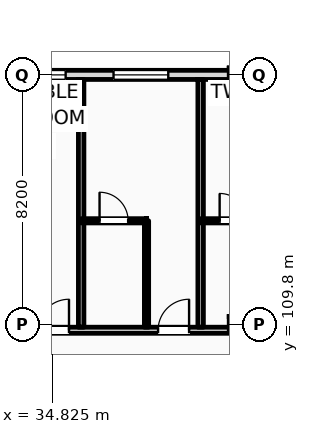
"""IFC4 building model, lengths in metres.
Left out: names, types, materials, properties, quantities, classifications, styles, units other than length and angle.
Written with IfcOpenShell. Run it as: python <this file> out.ifc"""

import sys

from ifc_helpers import new_model, si_unit, direction, frame, frame_2d, origin, place, context, subcontext, project, spatial, rectangle, extrude, element, fill, save


model = new_model("IFC4")
c1 = context("Model", 3, precision=1e-05, world=origin(), true_north=direction((0.0, 1.0)))
c2 = subcontext(c1, "Body", "Model", "MODEL_VIEW")
j1 = project(units=[si_unit("LENGTHUNIT", "METRE"), si_unit("PLANEANGLEUNIT", "RADIAN")], contexts=[c1])
p1 = place(None, origin())
s1 = spatial("IfcSite", under=j1, at=p1, CompositionType="ELEMENT")
p2 = place(p1, origin())
s2 = spatial("IfcBuilding", under=s1, at=p2, CompositionType="ELEMENT")
p3 = place(p2, frame((0.0, 0.0, 24.6)))
s3 = spatial("IfcBuildingStorey", under=s2, at=p3, CompositionType="ELEMENT", Elevation=24.6)
p4 = place(p3, frame((22.5, 118.0, 0.0), z_axis=(0.0, 0.0, 1.0), x_axis=(1.0, 0.0, 0.0)))
e1 = element("IfcWall", 1, at=p4, inside=s3, PredefinedType="STANDARD", context=c2, shape_type="SweptSolid", body=[
    extrude(rectangle(XDim=97.5, YDim=0.3, at=frame_2d((48.75, 0.0))), origin(), (0.0, 0.0, 1.0), 2.78),
])
p5 = place(p4, frame((0.91, 0.0, 0.9)))
e2 = element("IfcOpeningElement", 2, at=p5, cuts=e1, PredefinedType="OPENING", context=c2, shape_type="SweptSolid", body=[
    extrude(rectangle(XDim=0.9, YDim=1.7, at=frame_2d((0.45, 0.85))), frame((0.0, 0.16, 0.0), z_axis=(0.0, -1.0, 0.0), x_axis=(1.0, 0.0, 0.0)), (0.0, 0.0, 1.0), 0.32),
])
p6 = place(p4, frame((6.275, 0.0, 0.0)))
e3 = element("IfcOpeningElement", 3, at=p6, cuts=e1, PredefinedType="OPENING", context=c2, shape_type="SweptSolid", body=[
    extrude(rectangle(XDim=1.2, YDim=2.25, at=frame_2d((0.6, 1.125))), frame((0.0, 0.16, 0.0), z_axis=(0.0, -1.0, 0.0), x_axis=(1.0, 0.0, 0.0)), (0.0, 0.0, 1.0), 0.32),
])
p7 = place(p4, frame((11.42, 0.0, 0.9)))
e4 = element("IfcOpeningElement", 4, at=p7, cuts=e1, PredefinedType="OPENING", context=c2, shape_type="SweptSolid", body=[
    extrude(rectangle(XDim=1.35, YDim=1.7, at=frame_2d((0.675, 0.85))), frame((0.0, 0.16, 0.0), z_axis=(0.0, -1.0, 0.0), x_axis=(1.0, 0.0, 0.0)), (0.0, 0.0, 1.0), 0.32),
])
p8 = place(p4, frame((14.345, 0.0, 0.9)))
e5 = element("IfcOpeningElement", 5, at=p8, cuts=e1, PredefinedType="OPENING", context=c2, shape_type="SweptSolid", body=[
    extrude(rectangle(XDim=1.8, YDim=1.7, at=frame_2d((0.9, 0.85))), frame((0.0, 0.16, 0.0), z_axis=(0.0, -1.0, 0.0), x_axis=(1.0, 0.0, 0.0)), (0.0, 0.0, 1.0), 0.32),
])
p9 = place(p4, frame((19.27, 0.0, 0.9)))
e6 = element("IfcOpeningElement", 6, at=p9, cuts=e1, PredefinedType="OPENING", context=c2, shape_type="SweptSolid", body=[
    extrude(rectangle(XDim=1.95, YDim=1.7, at=frame_2d((0.975, 0.85))), frame((0.0, 0.16, 0.0), z_axis=(0.0, -1.0, 0.0), x_axis=(1.0, 0.0, 0.0)), (0.0, 0.0, 1.0), 0.32),
])
p10 = place(p4, frame((22.97, 0.0, 0.0)))
e7 = element("IfcOpeningElement", 7, at=p10, cuts=e1, PredefinedType="OPENING", context=c2, shape_type="SweptSolid", body=[
    extrude(rectangle(XDim=1.2, YDim=2.25, at=frame_2d((0.6, 1.125))), frame((0.0, 0.16, 0.0), z_axis=(0.0, -1.0, 0.0), x_axis=(1.0, 0.0, 0.0)), (0.0, 0.0, 1.0), 0.32),
])
p11 = place(p4, frame((26.92, 0.0, 0.9)))
e8 = element("IfcOpeningElement", 8, at=p11, cuts=e1, PredefinedType="OPENING", context=c2, shape_type="SweptSolid", body=[
    extrude(rectangle(XDim=2.25, YDim=1.7, at=frame_2d((1.125, 0.85))), frame((0.0, 0.16, 0.0), z_axis=(0.0, -1.0, 0.0), x_axis=(1.0, 0.0, 0.0)), (0.0, 0.0, 1.0), 0.32),
])
p12 = place(p4, frame((30.645, 0.0, 0.9)))
e9 = element("IfcOpeningElement", 9, at=p12, cuts=e1, PredefinedType="OPENING", context=c2, shape_type="SweptSolid", body=[
    extrude(rectangle(XDim=2.4, YDim=1.7, at=frame_2d((1.2, 0.85))), frame((0.0, 0.16, 0.0), z_axis=(0.0, -1.0, 0.0), x_axis=(1.0, 0.0, 0.0)), (0.0, 0.0, 1.0), 0.32),
])
p13 = place(p4, frame((36.71, 0.0, 0.0)))
e10 = element("IfcOpeningElement", 10, at=p13, cuts=e1, PredefinedType="OPENING", context=c2, shape_type="SweptSolid", body=[
    extrude(rectangle(XDim=1.2, YDim=2.25, at=frame_2d((0.6, 1.125))), frame((0.0, 0.16, 0.0), z_axis=(0.0, -1.0, 0.0), x_axis=(1.0, 0.0, 0.0)), (0.0, 0.0, 1.0), 0.32),
])
p14 = place(p4, frame((39.17, 0.0, 0.0)))
e11 = element("IfcOpeningElement", 11, at=p14, cuts=e1, PredefinedType="OPENING", context=c2, shape_type="SweptSolid", body=[
    extrude(rectangle(XDim=1.2, YDim=2.25, at=frame_2d((0.6, 1.125))), frame((0.0, 0.16, 0.0), z_axis=(0.0, -1.0, 0.0), x_axis=(1.0, 0.0, 0.0)), (0.0, 0.0, 1.0), 0.32),
])
p15 = place(p4, frame((43.22, 0.0, 0.9)))
e12 = element("IfcOpeningElement", 12, at=p15, cuts=e1, PredefinedType="OPENING", context=c2, shape_type="SweptSolid", body=[
    extrude(rectangle(XDim=2.85, YDim=1.7, at=frame_2d((1.425, 0.85))), frame((0.0, 0.16, 0.0), z_axis=(0.0, -1.0, 0.0), x_axis=(1.0, 0.0, 0.0)), (0.0, 0.0, 1.0), 0.32),
])
p16 = place(p4, frame((47.29, 0.0, 0.9)))
e13 = element("IfcOpeningElement", 13, at=p16, cuts=e1, PredefinedType="OPENING", context=c2, shape_type="SweptSolid", body=[
    extrude(rectangle(XDim=1.35, YDim=1.7, at=frame_2d((0.675, 0.85))), frame((0.0, 0.16, 0.0), z_axis=(0.0, -1.0, 0.0), x_axis=(1.0, 0.0, 0.0)), (0.0, 0.0, 1.0), 0.32),
])
p17 = place(p4, frame((52.91, 0.0, 0.0)))
e14 = element("IfcOpeningElement", 14, at=p17, cuts=e1, PredefinedType="OPENING", context=c2, shape_type="SweptSolid", body=[
    extrude(rectangle(XDim=1.2, YDim=2.25, at=frame_2d((0.6, 1.125))), frame((0.0, 0.16, 0.0), z_axis=(0.0, -1.0, 0.0), x_axis=(1.0, 0.0, 0.0)), (0.0, 0.0, 1.0), 0.32),
])
p18 = place(p4, frame((55.69, 0.0, 0.9)))
e15 = element("IfcOpeningElement", 15, at=p18, cuts=e1, PredefinedType="OPENING", context=c2, shape_type="SweptSolid", body=[
    extrude(rectangle(XDim=0.9, YDim=1.7, at=frame_2d((0.45, 0.85))), frame((0.0, 0.16, 0.0), z_axis=(0.0, -1.0, 0.0), x_axis=(1.0, 0.0, 0.0)), (0.0, 0.0, 1.0), 0.32),
])
p19 = place(p4, frame((59.82, 0.0, 0.9)))
e16 = element("IfcOpeningElement", 16, at=p19, cuts=e1, PredefinedType="OPENING", context=c2, shape_type="SweptSolid", body=[
    extrude(rectangle(XDim=3.25, YDim=1.7, at=frame_2d((1.625, 0.85))), frame((0.0, 0.16, 0.0), z_axis=(0.0, -1.0, 0.0), x_axis=(1.0, 0.0, 0.0)), (0.0, 0.0, 1.0), 0.32),
])
p20 = place(p4, frame((65.89, 0.0, 0.9)))
e17 = element("IfcOpeningElement", 17, at=p20, cuts=e1, PredefinedType="OPENING", context=c2, shape_type="SweptSolid", body=[
    extrude(rectangle(XDim=1.1, YDim=1.7, at=frame_2d((0.55, 0.85))), frame((0.0, 0.16, 0.0), z_axis=(0.0, -1.0, 0.0), x_axis=(1.0, 0.0, 0.0)), (0.0, 0.0, 1.0), 0.32),
])
p21 = place(p4, frame((69.245, 0.0, 0.0)))
e18 = element("IfcOpeningElement", 18, at=p21, cuts=e1, PredefinedType="OPENING", context=c2, shape_type="SweptSolid", body=[
    extrude(rectangle(XDim=1.2, YDim=2.25, at=frame_2d((0.6, 1.125))), frame((0.0, 0.16, 0.0), z_axis=(0.0, -1.0, 0.0), x_axis=(1.0, 0.0, 0.0)), (0.0, 0.0, 1.0), 0.32),
])
p22 = place(p4, frame((73.69, 0.0, 0.9)))
e19 = element("IfcOpeningElement", 19, at=p22, cuts=e1, PredefinedType="OPENING", context=c2, shape_type="SweptSolid", body=[
    extrude(rectangle(XDim=1.8, YDim=1.7, at=frame_2d((0.9, 0.85))), frame((0.0, 0.16, 0.0), z_axis=(0.0, -1.0, 0.0), x_axis=(1.0, 0.0, 0.0)), (0.0, 0.0, 1.0), 0.32),
])
p23 = place(p4, frame((76.62, 0.0, 0.9)))
e20 = element("IfcOpeningElement", 20, at=p23, cuts=e1, PredefinedType="OPENING", context=c2, shape_type="SweptSolid", body=[
    extrude(rectangle(XDim=3.25, YDim=1.7, at=frame_2d((1.625, 0.85))), frame((0.0, 0.16, 0.0), z_axis=(0.0, -1.0, 0.0), x_axis=(1.0, 0.0, 0.0)), (0.0, 0.0, 1.0), 0.32),
])
p24 = place(p4, frame((81.895, 0.0, 0.9)))
e21 = element("IfcOpeningElement", 21, at=p24, cuts=e1, PredefinedType="OPENING", context=c2, shape_type="SweptSolid", body=[
    extrude(rectangle(XDim=1.1, YDim=1.5, at=frame_2d((0.55, 0.75))), frame((0.0, 0.16, 0.0), z_axis=(0.0, -1.0, 0.0), x_axis=(1.0, 0.0, 0.0)), (0.0, 0.0, 1.0), 0.32),
])
p25 = place(p4, frame((86.02, 0.0, 0.9)))
e22 = element("IfcOpeningElement", 22, at=p25, cuts=e1, PredefinedType="OPENING", context=c2, shape_type="SweptSolid", body=[
    extrude(rectangle(XDim=1.25, YDim=1.6, at=frame_2d((0.625, 0.8))), frame((0.0, 0.16, 0.0), z_axis=(0.0, -1.0, 0.0), x_axis=(1.0, 0.0, 0.0)), (0.0, 0.0, 1.0), 0.32),
])
p26 = place(p4, frame((90.145, 0.0, 0.9)))
e23 = element("IfcOpeningElement", 23, at=p26, cuts=e1, PredefinedType="OPENING", context=c2, shape_type="SweptSolid", body=[
    extrude(rectangle(XDim=1.4, YDim=1.7, at=frame_2d((0.7, 0.85))), frame((0.0, 0.16, 0.0), z_axis=(0.0, -1.0, 0.0), x_axis=(1.0, 0.0, 0.0)), (0.0, 0.0, 1.0), 0.32),
])
p27 = place(p4, frame((94.155, 0.0, 0.9)))
e24 = element("IfcOpeningElement", 24, at=p27, cuts=e1, PredefinedType="OPENING", context=c2, shape_type="SweptSolid", body=[
    extrude(rectangle(XDim=1.6, YDim=1.7, at=frame_2d((0.8, 0.85))), frame((0.0, 0.16, 0.0), z_axis=(0.0, -1.0, 0.0), x_axis=(1.0, 0.0, 0.0)), (0.0, 0.0, 1.0), 0.32),
])
p28 = place(p3, frame((10.65, 109.6, 0.0), z_axis=(0.0, 0.0, 1.0), x_axis=(1.0, 0.0, 0.0)))
e25 = element("IfcWall", 25, at=p28, inside=s3, PredefinedType="PARTITIONING", context=c2, shape_type="SweptSolid", body=[
    extrude(rectangle(XDim=109.21, YDim=0.2, at=frame_2d((54.605, 0.0))), origin(), (0.0, 0.0, 1.0), 2.78),
])
p29 = place(p28, frame((12.705, 0.0, 0.0)))
e26 = element("IfcOpeningElement", 26, at=p29, cuts=e25, PredefinedType="OPENING", context=c2, shape_type="SweptSolid", body=[
    extrude(rectangle(XDim=1.02, YDim=2.2, at=frame_2d((0.51, 1.1))), frame((0.0, 0.11, 0.0), z_axis=(0.0, -1.0, 0.0), x_axis=(1.0, 0.0, 0.0)), (0.0, 0.0, 1.0), 0.22),
])
p30 = place(p28, frame((19.26, 0.0, 0.0)))
e27 = element("IfcOpeningElement", 27, at=p30, cuts=e25, PredefinedType="OPENING", context=c2, shape_type="SweptSolid", body=[
    extrude(rectangle(XDim=1.02, YDim=2.2, at=frame_2d((0.51, 1.1))), frame((0.0, 0.11, 0.0), z_axis=(0.0, -1.0, 0.0), x_axis=(1.0, 0.0, 0.0)), (0.0, 0.0, 1.0), 0.22),
])
p31 = place(p28, frame((23.71, 0.0, 0.0)))
e28 = element("IfcOpeningElement", 28, at=p31, cuts=e25, PredefinedType="OPENING", context=c2, shape_type="SweptSolid", body=[
    extrude(rectangle(XDim=1.02, YDim=2.2, at=frame_2d((0.51, 1.1))), frame((0.0, 0.11, 0.0), z_axis=(0.0, -1.0, 0.0), x_axis=(1.0, 0.0, 0.0)), (0.0, 0.0, 1.0), 0.22),
])
p32 = place(p28, frame((27.66, 0.0, 0.0)))
e29 = element("IfcOpeningElement", 29, at=p32, cuts=e25, PredefinedType="OPENING", context=c2, shape_type="SweptSolid", body=[
    extrude(rectangle(XDim=1.02, YDim=2.2, at=frame_2d((0.51, 1.1))), frame((0.0, 0.11, 0.0), z_axis=(0.0, -1.0, 0.0), x_axis=(1.0, 0.0, 0.0)), (0.0, 0.0, 1.0), 0.22),
])
p33 = place(p28, frame((31.89, 0.0, 0.0)))
e30 = element("IfcOpeningElement", 30, at=p33, cuts=e25, PredefinedType="OPENING", context=c2, shape_type="SweptSolid", body=[
    extrude(rectangle(XDim=0.96, YDim=2.2, at=frame_2d((0.48, 1.1))), frame((0.0, 0.11, 0.0), z_axis=(0.0, -1.0, 0.0), x_axis=(1.0, 0.0, 0.0)), (0.0, 0.0, 1.0), 0.22),
])
p34 = place(p28, frame((33.94, 0.0, 0.0)))
e31 = element("IfcOpeningElement", 31, at=p34, cuts=e25, PredefinedType="OPENING", context=c2, shape_type="SweptSolid", body=[
    extrude(rectangle(XDim=0.96, YDim=2.2, at=frame_2d((0.48, 1.1))), frame((0.0, 0.11, 0.0), z_axis=(0.0, -1.0, 0.0), x_axis=(1.0, 0.0, 0.0)), (0.0, 0.0, 1.0), 0.22),
])
p35 = place(p28, frame((40.29, 0.0, 0.0)))
e32 = element("IfcOpeningElement", 32, at=p35, cuts=e25, PredefinedType="OPENING", context=c2, shape_type="SweptSolid", body=[
    extrude(rectangle(XDim=0.96, YDim=2.2, at=frame_2d((0.48, 1.1))), frame((0.0, 0.11, 0.0), z_axis=(0.0, -1.0, 0.0), x_axis=(1.0, 0.0, 0.0)), (0.0, 0.0, 1.0), 0.22),
])
p36 = place(p28, frame((42.34, 0.0, 0.0)))
e33 = element("IfcOpeningElement", 33, at=p36, cuts=e25, PredefinedType="OPENING", context=c2, shape_type="SweptSolid", body=[
    extrude(rectangle(XDim=0.96, YDim=2.2, at=frame_2d((0.48, 1.1))), frame((0.0, 0.11, 0.0), z_axis=(0.0, -1.0, 0.0), x_axis=(1.0, 0.0, 0.0)), (0.0, 0.0, 1.0), 0.22),
])
p37 = place(p28, frame((48.69, 0.0, 0.0)))
e34 = element("IfcOpeningElement", 34, at=p37, cuts=e25, PredefinedType="OPENING", context=c2, shape_type="SweptSolid", body=[
    extrude(rectangle(XDim=0.96, YDim=2.2, at=frame_2d((0.48, 1.1))), frame((0.0, 0.11, 0.0), z_axis=(0.0, -1.0, 0.0), x_axis=(1.0, 0.0, 0.0)), (0.0, 0.0, 1.0), 0.22),
])
p38 = place(p28, frame((50.74, 0.0, 0.0)))
e35 = element("IfcOpeningElement", 35, at=p38, cuts=e25, PredefinedType="OPENING", context=c2, shape_type="SweptSolid", body=[
    extrude(rectangle(XDim=0.96, YDim=2.2, at=frame_2d((0.48, 1.1))), frame((0.0, 0.11, 0.0), z_axis=(0.0, -1.0, 0.0), x_axis=(1.0, 0.0, 0.0)), (0.0, 0.0, 1.0), 0.22),
])
p39 = place(p28, frame((57.09, 0.0, 0.0)))
e36 = element("IfcOpeningElement", 36, at=p39, cuts=e25, PredefinedType="OPENING", context=c2, shape_type="SweptSolid", body=[
    extrude(rectangle(XDim=0.96, YDim=2.2, at=frame_2d((0.48, 1.1))), frame((0.0, 0.11, 0.0), z_axis=(0.0, -1.0, 0.0), x_axis=(1.0, 0.0, 0.0)), (0.0, 0.0, 1.0), 0.22),
])
p40 = place(p28, frame((59.14, 0.0, 0.0)))
e37 = element("IfcOpeningElement", 37, at=p40, cuts=e25, PredefinedType="OPENING", context=c2, shape_type="SweptSolid", body=[
    extrude(rectangle(XDim=0.96, YDim=2.2, at=frame_2d((0.48, 1.1))), frame((0.0, 0.11, 0.0), z_axis=(0.0, -1.0, 0.0), x_axis=(1.0, 0.0, 0.0)), (0.0, 0.0, 1.0), 0.22),
])
p41 = place(p28, frame((65.49, 0.0, 0.0)))
e38 = element("IfcOpeningElement", 38, at=p41, cuts=e25, PredefinedType="OPENING", context=c2, shape_type="SweptSolid", body=[
    extrude(rectangle(XDim=0.96, YDim=2.2, at=frame_2d((0.48, 1.1))), frame((0.0, 0.11, 0.0), z_axis=(0.0, -1.0, 0.0), x_axis=(1.0, 0.0, 0.0)), (0.0, 0.0, 1.0), 0.22),
])
p42 = place(p28, frame((67.54, 0.0, 0.0)))
e39 = element("IfcOpeningElement", 39, at=p42, cuts=e25, PredefinedType="OPENING", context=c2, shape_type="SweptSolid", body=[
    extrude(rectangle(XDim=0.96, YDim=2.2, at=frame_2d((0.48, 1.1))), frame((0.0, 0.11, 0.0), z_axis=(0.0, -1.0, 0.0), x_axis=(1.0, 0.0, 0.0)), (0.0, 0.0, 1.0), 0.22),
])
p43 = place(p28, frame((73.89, 0.0, 0.0)))
e40 = element("IfcOpeningElement", 40, at=p43, cuts=e25, PredefinedType="OPENING", context=c2, shape_type="SweptSolid", body=[
    extrude(rectangle(XDim=0.96, YDim=2.2, at=frame_2d((0.48, 1.1))), frame((0.0, 0.11, 0.0), z_axis=(0.0, -1.0, 0.0), x_axis=(1.0, 0.0, 0.0)), (0.0, 0.0, 1.0), 0.22),
])
p44 = place(p28, frame((78.09, 0.0, 0.0)))
e41 = element("IfcOpeningElement", 41, at=p44, cuts=e25, PredefinedType="OPENING", context=c2, shape_type="SweptSolid", body=[
    extrude(rectangle(XDim=0.96, YDim=2.2, at=frame_2d((0.48, 1.1))), frame((0.0, 0.11, 0.0), z_axis=(0.0, -1.0, 0.0), x_axis=(1.0, 0.0, 0.0)), (0.0, 0.0, 1.0), 0.22),
])
p45 = place(p28, frame((82.29, 0.0, 0.0)))
e42 = element("IfcOpeningElement", 42, at=p45, cuts=e25, PredefinedType="OPENING", context=c2, shape_type="SweptSolid", body=[
    extrude(rectangle(XDim=0.96, YDim=2.2, at=frame_2d((0.48, 1.1))), frame((0.0, 0.11, 0.0), z_axis=(0.0, -1.0, 0.0), x_axis=(1.0, 0.0, 0.0)), (0.0, 0.0, 1.0), 0.22),
])
p46 = place(p28, frame((86.49, 0.0, 0.0)))
e43 = element("IfcOpeningElement", 43, at=p46, cuts=e25, PredefinedType="OPENING", context=c2, shape_type="SweptSolid", body=[
    extrude(rectangle(XDim=0.96, YDim=2.2, at=frame_2d((0.48, 1.1))), frame((0.0, 0.11, 0.0), z_axis=(0.0, -1.0, 0.0), x_axis=(1.0, 0.0, 0.0)), (0.0, 0.0, 1.0), 0.22),
])
p47 = place(p28, frame((88.54, 0.0, 0.0)))
e44 = element("IfcOpeningElement", 44, at=p47, cuts=e25, PredefinedType="OPENING", context=c2, shape_type="SweptSolid", body=[
    extrude(rectangle(XDim=0.96, YDim=2.2, at=frame_2d((0.48, 1.1))), frame((0.0, 0.11, 0.0), z_axis=(0.0, -1.0, 0.0), x_axis=(1.0, 0.0, 0.0)), (0.0, 0.0, 1.0), 0.22),
])
p48 = place(p28, frame((94.89, 0.0, 0.0)))
e45 = element("IfcOpeningElement", 45, at=p48, cuts=e25, PredefinedType="OPENING", context=c2, shape_type="SweptSolid", body=[
    extrude(rectangle(XDim=0.96, YDim=2.2, at=frame_2d((0.48, 1.1))), frame((0.0, 0.11, 0.0), z_axis=(0.0, -1.0, 0.0), x_axis=(1.0, 0.0, 0.0)), (0.0, 0.0, 1.0), 0.22),
])
p49 = place(p28, frame((96.94, 0.0, 0.0)))
e46 = element("IfcOpeningElement", 46, at=p49, cuts=e25, PredefinedType="OPENING", context=c2, shape_type="SweptSolid", body=[
    extrude(rectangle(XDim=0.96, YDim=2.2, at=frame_2d((0.48, 1.1))), frame((0.0, 0.11, 0.0), z_axis=(0.0, -1.0, 0.0), x_axis=(1.0, 0.0, 0.0)), (0.0, 0.0, 1.0), 0.22),
])
p50 = place(p28, frame((103.29, 0.0, 0.0)))
e47 = element("IfcOpeningElement", 47, at=p50, cuts=e25, PredefinedType="OPENING", context=c2, shape_type="SweptSolid", body=[
    extrude(rectangle(XDim=0.96, YDim=2.2, at=frame_2d((0.48, 1.1))), frame((0.0, 0.11, 0.0), z_axis=(0.0, -1.0, 0.0), x_axis=(1.0, 0.0, 0.0)), (0.0, 0.0, 1.0), 0.22),
])
p51 = place(p28, frame((105.25, 0.0, 0.0)))
e48 = element("IfcOpeningElement", 48, at=p51, cuts=e25, PredefinedType="OPENING", context=c2, shape_type="SweptSolid", body=[
    extrude(rectangle(XDim=0.96, YDim=2.2, at=frame_2d((0.48, 1.1))), frame((0.0, 0.11, 0.0), z_axis=(0.0, -1.0, 0.0), x_axis=(1.0, 0.0, 0.0)), (0.0, 0.0, 1.0), 0.22),
])
p52 = place(p28, frame((2.716, 0.0, 0.0)))
e49 = element("IfcOpeningElement", 49, at=p52, cuts=e25, PredefinedType="OPENING", context=c2, shape_type="SweptSolid", body=[
    extrude(rectangle(XDim=1.35, YDim=2.25, at=frame_2d((0.675, 1.125))), frame((0.0, 0.11, 0.0), z_axis=(0.0, -1.0, 0.0), x_axis=(1.0, 0.0, 0.0)), (0.0, 0.0, 1.0), 0.22),
])
p53 = place(p28, frame((6.65, 0.0, 0.0)))
e50 = element("IfcOpeningElement", 50, at=p53, cuts=e25, PredefinedType="OPENING", context=c2, shape_type="SweptSolid", body=[
    extrude(rectangle(XDim=1.35, YDim=2.25, at=frame_2d((0.675, 1.125))), frame((0.0, 0.11, 0.0), z_axis=(0.0, -1.0, 0.0), x_axis=(1.0, 0.0, 0.0)), (0.0, 0.0, 1.0), 0.22),
])
p54 = place(p28, frame((10.583, 0.0, 0.0)))
e51 = element("IfcOpeningElement", 51, at=p54, cuts=e25, PredefinedType="OPENING", context=c2, shape_type="SweptSolid", body=[
    extrude(rectangle(XDim=1.35, YDim=2.25, at=frame_2d((0.675, 1.125))), frame((0.0, 0.11, 0.0), z_axis=(0.0, -1.0, 0.0), x_axis=(1.0, 0.0, 0.0)), (0.0, 0.0, 1.0), 0.22),
])
p55 = place(p3, frame((35.78, 109.7, 0.0), z_axis=(0.0, 0.0, 1.0), x_axis=(0.0, 1.0, 0.0)))
e52 = element("IfcWall", 52, at=p55, inside=s3, PredefinedType="PARTITIONING", context=c2, shape_type="SweptSolid", body=[
    extrude(rectangle(XDim=8.15, YDim=0.18, at=frame_2d((4.075, 0.0))), origin(), (0.0, 0.0, 1.0), 3.03),
])
p56 = place(p3, frame((39.71, 109.7, 0.0), z_axis=(0.0, 0.0, 1.0), x_axis=(0.0, 1.0, 0.0)))
e53 = element("IfcWall", 53, at=p56, inside=s3, PredefinedType="PARTITIONING", context=c2, shape_type="SweptSolid", body=[
    extrude(rectangle(XDim=8.15, YDim=0.18, at=frame_2d((4.075, 0.0))), origin(), (0.0, 0.0, 1.0), 3.34),
])
p57 = place(p3, frame((37.93, 109.7, 0.0), z_axis=(0.0, 0.0, 1.0), x_axis=(0.0, 1.0, 0.0)))
e54 = element("IfcWall", 54, at=p57, inside=s3, PredefinedType="PARTITIONING", context=c2, shape_type="SweptSolid", body=[
    extrude(rectangle(XDim=3.5, YDim=0.14, at=frame_2d((1.75, 0.0))), origin(), (0.0, 0.0, 1.0), 3.34),
])
p58 = place(p3, frame((35.78, 113.2, 0.0), z_axis=(0.0, 0.0, 1.0), x_axis=(1.0, 0.0, 0.0)))
e55 = element("IfcWall", 55, at=p58, inside=s3, PredefinedType="PARTITIONING", context=c2, shape_type="SweptSolid", body=[
    extrude(rectangle(XDim=2.15, YDim=0.14, at=frame_2d((1.075, 0.0))), origin(), (0.0, 0.0, 1.0), 3.34),
])
p59 = place(p58, frame((0.605, 0.0, 0.0)))
e56 = element("IfcOpeningElement", 56, at=p59, cuts=e55, PredefinedType="OPENING", context=c2, shape_type="SweptSolid", body=[
    extrude(rectangle(XDim=0.94, YDim=2.15, at=frame_2d((0.47, 1.075))), frame((0.0, 0.08, 0.0), z_axis=(0.0, -1.0, 0.0), x_axis=(1.0, 0.0, 0.0)), (0.0, 0.0, 1.0), 0.16),
])
p60 = place(p3, frame((39.71, 113.2, 0.0), z_axis=(0.0, 0.0, 1.0), x_axis=(1.0, 0.0, 0.0)))
e57 = element("IfcWall", 57, at=p60, inside=s3, PredefinedType="PARTITIONING", context=c2, shape_type="SweptSolid", body=[
    extrude(rectangle(XDim=2.15, YDim=0.14, at=frame_2d((1.075, 0.0))), origin(), (0.0, 0.0, 1.0), 3.34),
])
p61 = place(p60, frame((0.625, 0.0, 0.0)))
e58 = element("IfcOpeningElement", 58, at=p61, cuts=e57, PredefinedType="OPENING", context=c2, shape_type="SweptSolid", body=[
    extrude(rectangle(XDim=0.9, YDim=2.1, at=frame_2d((0.45, 1.05))), frame((0.0, 0.08, 0.0), z_axis=(0.0, -1.0, 0.0), x_axis=(1.0, 0.0, 0.0)), (0.0, 0.0, 1.0), 0.16),
])
p62 = place(p7, origin())
e59 = element("IfcWindow", 59, at=p62, inside=s3, PartitioningType="DOUBLE_PANEL_VERTICAL", PredefinedType="WINDOW", context=c2, shape_type="SweptSolid", body=[
    extrude(rectangle(XDim=1.35, YDim=1.7, at=frame_2d((0.675, 0.85))), frame((0.0, 0.03, 0.0), z_axis=(0.0, -1.0, 0.0), x_axis=(1.0, 0.0, 0.0)), (0.0, 0.0, 1.0), 0.06),
])
fill(e4, e59)
p63 = place(p8, origin())
e60 = element("IfcWindow", 60, at=p63, inside=s3, PartitioningType="DOUBLE_PANEL_VERTICAL", PredefinedType="WINDOW", context=c2, shape_type="SweptSolid", body=[
    extrude(rectangle(XDim=1.8, YDim=1.7, at=frame_2d((0.9, 0.85))), frame((0.0, 0.03, 0.0), z_axis=(0.0, -1.0, 0.0), x_axis=(1.0, 0.0, 0.0)), (0.0, 0.0, 1.0), 0.06),
])
fill(e5, e60)
p64 = place(p31, origin())
e61 = element("IfcDoor", 61, at=p64, inside=s3, OperationType="SINGLE_SWING_RIGHT", PredefinedType="DOOR", context=c2, shape_type="SweptSolid", body=[
    extrude(rectangle(XDim=1.02, YDim=2.2, at=frame_2d((0.51, 1.1))), frame((0.0, 0.025, 0.0), z_axis=(0.0, -1.0, 0.0), x_axis=(1.0, 0.0, 0.0)), (0.0, 0.0, 1.0), 0.05),
])
fill(e28, e61)
p65 = place(p32, origin())
e62 = element("IfcDoor", 62, at=p65, inside=s3, OperationType="SINGLE_SWING_RIGHT", PredefinedType="DOOR", context=c2, shape_type="SweptSolid", body=[
    extrude(rectangle(XDim=1.02, YDim=2.2, at=frame_2d((0.51, 1.1))), frame((0.0, 0.025, 0.0), z_axis=(0.0, -1.0, 0.0), x_axis=(1.0, 0.0, 0.0)), (0.0, 0.0, 1.0), 0.05),
])
fill(e29, e62)
p66 = place(p59, origin())
e63 = element("IfcDoor", 63, at=p66, inside=s3, OperationType="SINGLE_SWING_LEFT", PredefinedType="DOOR", context=c2, shape_type="SweptSolid", body=[
    extrude(rectangle(XDim=0.94, YDim=2.15, at=frame_2d((0.47, 1.075))), frame((0.0, 0.025, 0.0), z_axis=(0.0, -1.0, 0.0), x_axis=(1.0, 0.0, 0.0)), (0.0, 0.0, 1.0), 0.05),
])
fill(e56, e63)
p67 = place(p61, origin())
e64 = element("IfcDoor", 64, at=p67, inside=s3, OperationType="SINGLE_SWING_LEFT", PredefinedType="DOOR", context=c2, shape_type="SweptSolid", body=[
    extrude(rectangle(XDim=0.9, YDim=2.1, at=frame_2d((0.45, 1.05))), frame((0.0, 0.025, 0.0), z_axis=(0.0, -1.0, 0.0), x_axis=(1.0, 0.0, 0.0)), (0.0, 0.0, 1.0), 0.05),
])
fill(e58, e64)
save(model, sys.argv[1])
